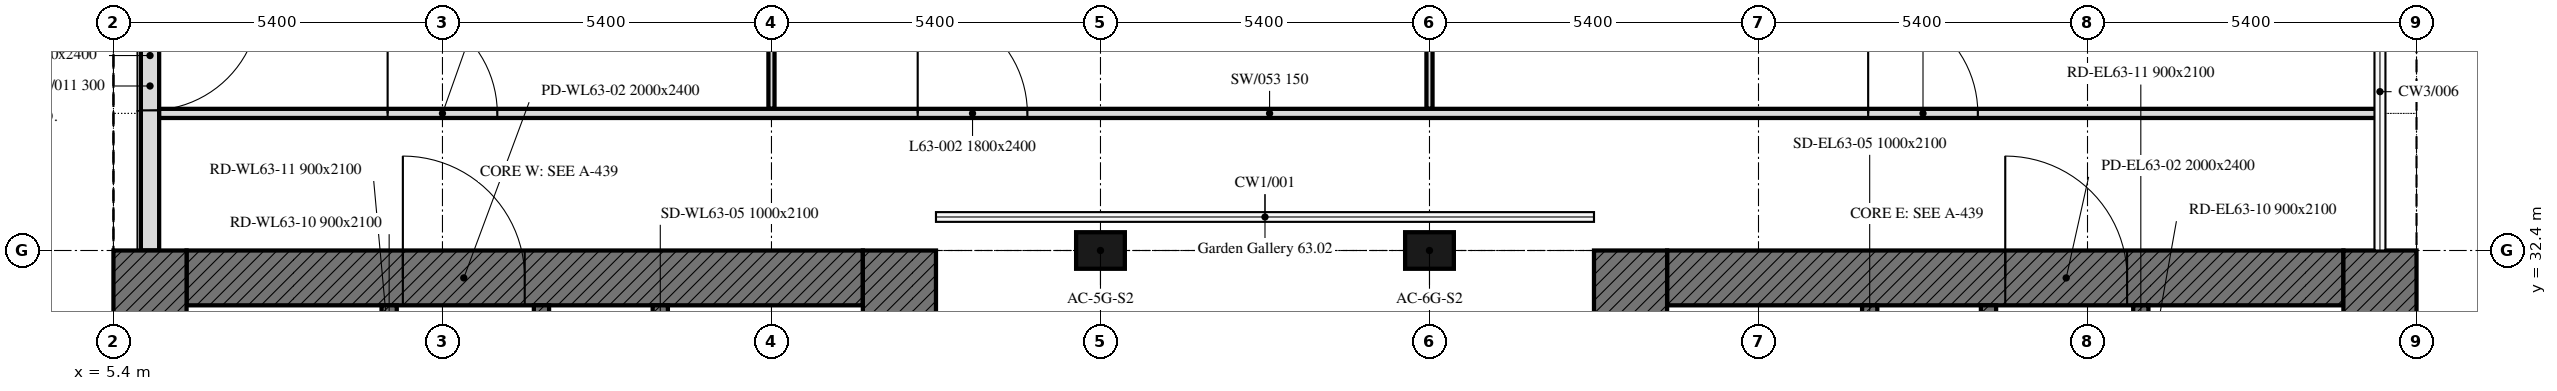
"""IFC4 building model, lengths in metres.
Left out: names, types, materials, properties, quantities, classifications, styles, units other than length and angle.
Written with IfcOpenShell. Run it as: python <this file> out.ifc"""

import sys

from ifc_helpers import new_model, si_unit, direction, frame, frame_2d, origin, origin_2d, place, context, subcontext, project, spatial, rectangle, extrude, element, fill, save


model = new_model("IFC4")
c1 = context("Model", 3, precision=1e-05, world=origin(), true_north=direction((0.0, 1.0)))
c2 = subcontext(c1, "Body", "Model", "MODEL_VIEW")
j1 = project(units=[si_unit("LENGTHUNIT", "METRE"), si_unit("PLANEANGLEUNIT", "RADIAN")], contexts=[c1])
p1 = place(None, origin())
s1 = spatial("IfcSite", under=j1, at=p1, CompositionType="ELEMENT")
p2 = place(p1, origin())
s2 = spatial("IfcBuilding", under=s1, at=p2, CompositionType="ELEMENT")
p3 = place(p2, frame((0.0, 0.0, 260.5)))
s3 = spatial("IfcBuildingStorey", under=s2, at=p3, CompositionType="ELEMENT", Elevation=260.5)
for number, where, z_axis, x_axis in (
    (1, (21.6, 32.4, 0.0), (0.0, 0.0, 1.0), (1.0, 0.0, 0.0)),
    (2, (27.0, 32.4, 0.0), (0.0, 0.0, 1.0), (1.0, 0.0, 0.0)),
):
    element("IfcColumn", number, at=place(p3, frame(where, z_axis=z_axis, x_axis=x_axis)), inside=s3, PredefinedType="COLUMN", context=c2, shape_type="SweptSolid", body=[
        extrude(rectangle(XDim=0.8, YDim=0.6, at=origin_2d()), origin(), (0.0, 0.0, 1.0), 4.5),
    ])
p4 = place(p3, frame((6.0, 37.8, 0.0), z_axis=(0.0, 0.0, 1.0), x_axis=(0.0, -1.0, 0.0)))
e3 = element("IfcWall", 3, at=p4, inside=s3, PredefinedType="SOLIDWALL", context=c2, shape_type="SweptSolid", body=[
    extrude(rectangle(XDim=5.4, YDim=0.3, at=frame_2d((2.7, 0.0))), origin(), (0.0, 0.0, 1.0), 4.5),
])
p5 = place(p4, frame((1.3, 0.0, 0.0)))
e4 = element("IfcOpeningElement", 4, at=p5, cuts=e3, PredefinedType="OPENING", context=c2, shape_type="SweptSolid", body=[
    extrude(rectangle(XDim=1.8, YDim=2.4, at=frame_2d((0.9, 1.2))), frame((0.0, 0.16, 0.0), z_axis=(0.0, -1.0, 0.0), x_axis=(1.0, 0.0, 0.0)), (0.0, 0.0, 1.0), 0.32),
])
p6 = place(p3, frame((6.6, 31.95, 0.0), z_axis=(0.0, 0.0, 1.0), x_axis=(1.0, 0.0, 0.0)))
e5 = element("IfcWall", 5, at=p6, inside=s3, PredefinedType="SOLIDWALL", context=c2, shape_type="SweptSolid", body=[
    extrude(rectangle(XDim=11.1, YDim=0.9, at=frame_2d((5.55, 0.0))), origin(), (0.0, 0.0, 1.0), 4.5),
])
p7 = place(p6, frame((3.55, 0.0, 0.0)))
e6 = element("IfcOpeningElement", 6, at=p7, cuts=e5, PredefinedType="OPENING", context=c2, shape_type="SweptSolid", body=[
    extrude(rectangle(XDim=2.0, YDim=2.4, at=frame_2d((1.0, 1.2))), frame((0.0, 0.45, 0.0), z_axis=(0.0, -1.0, 0.0), x_axis=(1.0, 0.0, 0.0)), (0.0, 0.0, 1.0), 0.9),
])
for number, where, z_axis, x_axis in (
    (7, (6.0, 16.2, 0.0), (0.0, 0.0, 1.0), (0.0, 1.0, 0.0)),
    (8, (18.3, 32.4, 0.0), (0.0, 0.0, 1.0), (0.0, -1.0, 0.0)),
):
    element("IfcWall", number, at=place(p3, frame(where, z_axis=z_axis, x_axis=x_axis)), inside=s3, PredefinedType="SOLIDWALL", context=c2, shape_type="SweptSolid", body=[
        extrude(rectangle(XDim=16.2, YDim=1.2, at=frame_2d((8.1, 0.0))), origin(), (0.0, 0.0, 1.0), 4.5),
    ])
p8 = place(p3, frame((9.925, 17.1, 0.0), z_axis=(0.0, 0.0, 1.0), x_axis=(0.0, 1.0, 0.0)))
e9 = element("IfcWall", 9, at=p8, inside=s3, PredefinedType="SOLIDWALL", context=c2, shape_type="SweptSolid", body=[
    extrude(rectangle(XDim=14.4, YDim=0.25, at=frame_2d((7.2, 0.0))), origin(), (0.0, 0.0, 1.0), 4.5),
])
p9 = place(p8, frame((4.6, 0.0, 0.0)))
e10 = element("IfcOpeningElement", 10, at=p9, cuts=e9, PredefinedType="OPENING", context=c2, shape_type="SweptSolid", body=[
    extrude(rectangle(XDim=1.0, YDim=2.1, at=frame_2d((0.5, 1.05))), frame((0.0, 0.125, 0.0), z_axis=(0.0, -1.0, 0.0), x_axis=(1.0, 0.0, 0.0)), (0.0, 0.0, 1.0), 0.25),
])
p10 = place(p8, frame((7.062, 0.0, 0.0)))
e11 = element("IfcOpeningElement", 11, at=p10, cuts=e9, PredefinedType="OPENING", context=c2, shape_type="SweptSolid", body=[
    extrude(rectangle(XDim=1.2, YDim=2.1, at=frame_2d((0.6, 1.05))), frame((0.0, 0.125, 0.0), z_axis=(0.0, -1.0, 0.0), x_axis=(1.0, 0.0, 0.0)), (0.0, 0.0, 1.0), 0.25),
])
p11 = place(p8, frame((9.726, 0.0, 0.0)))
e12 = element("IfcOpeningElement", 12, at=p11, cuts=e9, PredefinedType="OPENING", context=c2, shape_type="SweptSolid", body=[
    extrude(rectangle(XDim=0.9, YDim=2.1, at=frame_2d((0.45, 1.05))), frame((0.0, 0.125, 0.0), z_axis=(0.0, -1.0, 0.0), x_axis=(1.0, 0.0, 0.0)), (0.0, 0.0, 1.0), 0.25),
])
p12 = place(p8, frame((11.539, 0.0, 0.0)))
e13 = element("IfcOpeningElement", 13, at=p12, cuts=e9, PredefinedType="OPENING", context=c2, shape_type="SweptSolid", body=[
    extrude(rectangle(XDim=0.9, YDim=2.1, at=frame_2d((0.45, 1.05))), frame((0.0, 0.125, 0.0), z_axis=(0.0, -1.0, 0.0), x_axis=(1.0, 0.0, 0.0)), (0.0, 0.0, 1.0), 0.25),
])
p13 = place(p8, frame((13.226, 0.0, 0.0)))
e14 = element("IfcOpeningElement", 14, at=p13, cuts=e9, PredefinedType="OPENING", context=c2, shape_type="SweptSolid", body=[
    extrude(rectangle(XDim=0.9, YDim=2.1, at=frame_2d((0.45, 1.05))), frame((0.0, 0.125, 0.0), z_axis=(0.0, -1.0, 0.0), x_axis=(1.0, 0.0, 0.0)), (0.0, 0.0, 1.0), 0.25),
])
p14 = place(p3, frame((14.375, 17.1, 0.0), z_axis=(0.0, 0.0, 1.0), x_axis=(0.0, 1.0, 0.0)))
e15 = element("IfcWall", 15, at=p14, inside=s3, PredefinedType="SOLIDWALL", context=c2, shape_type="SweptSolid", body=[
    extrude(rectangle(XDim=14.4, YDim=0.25, at=frame_2d((7.2, 0.0))), origin(), (0.0, 0.0, 1.0), 4.5),
])
p15 = place(p14, frame((13.15, 0.0, 0.0)))
e16 = element("IfcOpeningElement", 16, at=p15, cuts=e15, PredefinedType="OPENING", context=c2, shape_type="SweptSolid", body=[
    extrude(rectangle(XDim=1.0, YDim=2.1, at=frame_2d((0.5, 1.05))), frame((0.0, 0.125, 0.0), z_axis=(0.0, -1.0, 0.0), x_axis=(1.0, 0.0, 0.0)), (0.0, 0.0, 1.0), 0.25),
])
p16 = place(p14, frame((3.15, 0.0, 0.0)))
e17 = element("IfcOpeningElement", 17, at=p16, cuts=e15, PredefinedType="OPENING", context=c2, shape_type="SweptSolid", body=[
    extrude(rectangle(XDim=1.1, YDim=2.1, at=frame_2d((0.55, 1.05))), frame((0.0, 0.125, 0.0), z_axis=(0.0, -1.0, 0.0), x_axis=(1.0, 0.0, 0.0)), (0.0, 0.0, 1.0), 0.25),
])
p17 = place(p14, frame((0.7, 0.0, 0.0)))
e18 = element("IfcOpeningElement", 18, at=p17, cuts=e15, PredefinedType="OPENING", context=c2, shape_type="SweptSolid", body=[
    extrude(rectangle(XDim=0.9, YDim=2.1, at=frame_2d((0.45, 1.05))), frame((0.0, 0.125, 0.0), z_axis=(0.0, -1.0, 0.0), x_axis=(1.0, 0.0, 0.0)), (0.0, 0.0, 1.0), 0.25),
])
p18 = place(p14, frame((6.175, 0.0, 0.0)))
e19 = element("IfcOpeningElement", 19, at=p18, cuts=e15, PredefinedType="OPENING", context=c2, shape_type="SweptSolid", body=[
    extrude(rectangle(XDim=0.9, YDim=2.1, at=frame_2d((0.45, 1.05))), frame((0.0, 0.125, 0.0), z_axis=(0.0, -1.0, 0.0), x_axis=(1.0, 0.0, 0.0)), (0.0, 0.0, 1.0), 0.25),
])
p19 = place(p3, frame((12.425, 29.4, 0.0), z_axis=(0.0, 0.0, 1.0), x_axis=(0.0, 1.0, 0.0)))
e20 = element("IfcWall", 20, at=p19, inside=s3, PredefinedType="SOLIDWALL", context=c2, shape_type="SweptSolid", body=[
    extrude(rectangle(XDim=2.1, YDim=0.25, at=frame_2d((1.05, 0.0))), origin(), (0.0, 0.0, 1.0), 4.5),
])
p20 = place(p19, frame((0.5, 0.0, 0.0)))
e21 = element("IfcOpeningElement", 21, at=p20, cuts=e20, PredefinedType="OPENING", context=c2, shape_type="SweptSolid", body=[
    extrude(rectangle(XDim=1.0, YDim=2.1, at=frame_2d((0.5, 1.05))), frame((0.0, 0.125, 0.0), z_axis=(0.0, -1.0, 0.0), x_axis=(1.0, 0.0, 0.0)), (0.0, 0.0, 1.0), 0.25),
])
p21 = place(p3, frame((30.9, 31.95, 0.0), z_axis=(0.0, 0.0, 1.0), x_axis=(1.0, 0.0, 0.0)))
e22 = element("IfcWall", 22, at=p21, inside=s3, PredefinedType="SOLIDWALL", context=c2, shape_type="SweptSolid", body=[
    extrude(rectangle(XDim=11.1, YDim=0.9, at=frame_2d((5.55, 0.0))), origin(), (0.0, 0.0, 1.0), 4.5),
])
p22 = place(p21, frame((5.55, 0.0, 0.0)))
e23 = element("IfcOpeningElement", 23, at=p22, cuts=e22, PredefinedType="OPENING", context=c2, shape_type="SweptSolid", body=[
    extrude(rectangle(XDim=2.0, YDim=2.4, at=frame_2d((1.0, 1.2))), frame((0.0, 0.45, 0.0), z_axis=(0.0, -1.0, 0.0), x_axis=(1.0, 0.0, 0.0)), (0.0, 0.0, 1.0), 0.9),
])
for number, where, z_axis, x_axis in (
    (24, (42.6, 32.4, 0.0), (0.0, 0.0, 1.0), (0.0, -1.0, 0.0)),
    (25, (30.3, 16.2, 0.0), (0.0, 0.0, 1.0), (0.0, 1.0, 0.0)),
):
    element("IfcWall", number, at=place(p3, frame(where, z_axis=z_axis, x_axis=x_axis)), inside=s3, PredefinedType="SOLIDWALL", context=c2, shape_type="SweptSolid", body=[
        extrude(rectangle(XDim=16.2, YDim=1.2, at=frame_2d((8.1, 0.0))), origin(), (0.0, 0.0, 1.0), 4.5),
    ])
p23 = place(p3, frame((38.675, 17.1, 0.0), z_axis=(0.0, 0.0, 1.0), x_axis=(0.0, 1.0, 0.0)))
e26 = element("IfcWall", 26, at=p23, inside=s3, PredefinedType="SOLIDWALL", context=c2, shape_type="SweptSolid", body=[
    extrude(rectangle(XDim=14.4, YDim=0.25, at=frame_2d((7.2, 0.0))), origin(), (0.0, 0.0, 1.0), 4.5),
])
p24 = place(p23, frame((4.6, 0.0, 0.0)))
e27 = element("IfcOpeningElement", 27, at=p24, cuts=e26, PredefinedType="OPENING", context=c2, shape_type="SweptSolid", body=[
    extrude(rectangle(XDim=1.0, YDim=2.1, at=frame_2d((0.5, 1.05))), frame((0.0, 0.125, 0.0), z_axis=(0.0, -1.0, 0.0), x_axis=(1.0, 0.0, 0.0)), (0.0, 0.0, 1.0), 0.25),
])
p25 = place(p23, frame((7.062, 0.0, 0.0)))
e28 = element("IfcOpeningElement", 28, at=p25, cuts=e26, PredefinedType="OPENING", context=c2, shape_type="SweptSolid", body=[
    extrude(rectangle(XDim=1.2, YDim=2.1, at=frame_2d((0.6, 1.05))), frame((0.0, 0.125, 0.0), z_axis=(0.0, -1.0, 0.0), x_axis=(1.0, 0.0, 0.0)), (0.0, 0.0, 1.0), 0.25),
])
p26 = place(p23, frame((10.106, 0.0, 0.0)))
e29 = element("IfcOpeningElement", 29, at=p26, cuts=e26, PredefinedType="OPENING", context=c2, shape_type="SweptSolid", body=[
    extrude(rectangle(XDim=0.9, YDim=2.1, at=frame_2d((0.45, 1.05))), frame((0.0, 0.125, 0.0), z_axis=(0.0, -1.0, 0.0), x_axis=(1.0, 0.0, 0.0)), (0.0, 0.0, 1.0), 0.25),
])
p27 = place(p23, frame((12.048, 0.0, 0.0)))
e30 = element("IfcOpeningElement", 30, at=p27, cuts=e26, PredefinedType="OPENING", context=c2, shape_type="SweptSolid", body=[
    extrude(rectangle(XDim=0.9, YDim=2.1, at=frame_2d((0.45, 1.05))), frame((0.0, 0.125, 0.0), z_axis=(0.0, -1.0, 0.0), x_axis=(1.0, 0.0, 0.0)), (0.0, 0.0, 1.0), 0.25),
])
p28 = place(p23, frame((13.354, 0.0, 0.0)))
e31 = element("IfcOpeningElement", 31, at=p28, cuts=e26, PredefinedType="OPENING", context=c2, shape_type="SweptSolid", body=[
    extrude(rectangle(XDim=0.9, YDim=2.1, at=frame_2d((0.45, 1.05))), frame((0.0, 0.125, 0.0), z_axis=(0.0, -1.0, 0.0), x_axis=(1.0, 0.0, 0.0)), (0.0, 0.0, 1.0), 0.25),
])
p29 = place(p3, frame((34.225, 17.1, 0.0), z_axis=(0.0, 0.0, 1.0), x_axis=(0.0, 1.0, 0.0)))
e32 = element("IfcWall", 32, at=p29, inside=s3, PredefinedType="SOLIDWALL", context=c2, shape_type="SweptSolid", body=[
    extrude(rectangle(XDim=14.4, YDim=0.25, at=frame_2d((7.2, 0.0))), origin(), (0.0, 0.0, 1.0), 4.5),
])
p30 = place(p29, frame((13.15, 0.0, 0.0)))
e33 = element("IfcOpeningElement", 33, at=p30, cuts=e32, PredefinedType="OPENING", context=c2, shape_type="SweptSolid", body=[
    extrude(rectangle(XDim=1.0, YDim=2.1, at=frame_2d((0.5, 1.05))), frame((0.0, 0.125, 0.0), z_axis=(0.0, -1.0, 0.0), x_axis=(1.0, 0.0, 0.0)), (0.0, 0.0, 1.0), 0.25),
])
p31 = place(p29, frame((3.15, 0.0, 0.0)))
e34 = element("IfcOpeningElement", 34, at=p31, cuts=e32, PredefinedType="OPENING", context=c2, shape_type="SweptSolid", body=[
    extrude(rectangle(XDim=1.1, YDim=2.1, at=frame_2d((0.55, 1.05))), frame((0.0, 0.125, 0.0), z_axis=(0.0, -1.0, 0.0), x_axis=(1.0, 0.0, 0.0)), (0.0, 0.0, 1.0), 0.25),
])
p32 = place(p29, frame((0.7, 0.0, 0.0)))
e35 = element("IfcOpeningElement", 35, at=p32, cuts=e32, PredefinedType="OPENING", context=c2, shape_type="SweptSolid", body=[
    extrude(rectangle(XDim=0.9, YDim=2.1, at=frame_2d((0.45, 1.05))), frame((0.0, 0.125, 0.0), z_axis=(0.0, -1.0, 0.0), x_axis=(1.0, 0.0, 0.0)), (0.0, 0.0, 1.0), 0.25),
])
p33 = place(p29, frame((6.175, 0.0, 0.0)))
e36 = element("IfcOpeningElement", 36, at=p33, cuts=e32, PredefinedType="OPENING", context=c2, shape_type="SweptSolid", body=[
    extrude(rectangle(XDim=0.9, YDim=2.1, at=frame_2d((0.45, 1.05))), frame((0.0, 0.125, 0.0), z_axis=(0.0, -1.0, 0.0), x_axis=(1.0, 0.0, 0.0)), (0.0, 0.0, 1.0), 0.25),
])
p34 = place(p3, frame((36.175, 29.4, 0.0), z_axis=(0.0, 0.0, 1.0), x_axis=(0.0, 1.0, 0.0)))
e37 = element("IfcWall", 37, at=p34, inside=s3, PredefinedType="SOLIDWALL", context=c2, shape_type="SweptSolid", body=[
    extrude(rectangle(XDim=2.1, YDim=0.25, at=frame_2d((1.05, 0.0))), origin(), (0.0, 0.0, 1.0), 4.5),
])
p35 = place(p34, frame((0.5, 0.0, 0.0)))
e38 = element("IfcOpeningElement", 38, at=p35, cuts=e37, PredefinedType="OPENING", context=c2, shape_type="SweptSolid", body=[
    extrude(rectangle(XDim=1.0, YDim=2.1, at=frame_2d((0.5, 1.05))), frame((0.0, 0.125, 0.0), z_axis=(0.0, -1.0, 0.0), x_axis=(1.0, 0.0, 0.0)), (0.0, 0.0, 1.0), 0.25),
])
for number, where, z_axis, x_axis in (
    (39, (27.0, 37.43, 0.0), (0.0, 0.0, 1.0), (0.0, -1.0, 0.0)),
    (40, (16.2, 37.43, 0.0), (0.0, 0.0, 1.0), (0.0, -1.0, 0.0)),
):
    element("IfcWall", number, at=place(p3, frame(where, z_axis=z_axis, x_axis=x_axis)), inside=s3, PredefinedType="PARTITIONING", context=c2, shape_type="SweptSolid", body=[
        extrude(rectangle(XDim=2.705, YDim=0.1, at=frame_2d((1.353, 0.0))), origin(), (0.0, 0.0, 1.0), 4.5),
    ])
p36 = place(p3, frame((6.151, 34.65, 0.0), z_axis=(0.0, 0.0, 1.0), x_axis=(1.0, 0.0, 0.0)))
e41 = element("IfcWall", 41, at=p36, inside=s3, PredefinedType="PARTITIONING", context=c2, shape_type="SweptSolid", body=[
    extrude(rectangle(XDim=36.449, YDim=0.15, at=frame_2d((18.225, 0.0))), origin(), (0.0, 0.0, 1.0), 4.5),
])
p37 = place(p36, frame((28.049, 0.0, 0.0)))
e42 = element("IfcOpeningElement", 42, at=p37, cuts=e41, PredefinedType="OPENING", context=c2, shape_type="SweptSolid", body=[
    extrude(rectangle(XDim=1.8, YDim=2.4, at=frame_2d((0.9, 1.2))), frame((0.0, 0.075, 0.0), z_axis=(0.0, -1.0, 0.0), x_axis=(1.0, 0.0, 0.0)), (0.0, 0.0, 1.0), 0.15),
])
p38 = place(p36, frame((12.449, 0.0, 0.0)))
e43 = element("IfcOpeningElement", 43, at=p38, cuts=e41, PredefinedType="OPENING", context=c2, shape_type="SweptSolid", body=[
    extrude(rectangle(XDim=1.8, YDim=2.4, at=frame_2d((0.9, 1.2))), frame((0.0, 0.075, 0.0), z_axis=(0.0, -1.0, 0.0), x_axis=(1.0, 0.0, 0.0)), (0.0, 0.0, 1.0), 0.15),
])
p39 = place(p36, frame((3.749, 0.0, 0.0)))
e44 = element("IfcOpeningElement", 44, at=p39, cuts=e41, PredefinedType="OPENING", context=c2, shape_type="SweptSolid", body=[
    extrude(rectangle(XDim=1.8, YDim=2.4, at=frame_2d((0.9, 1.2))), frame((0.0, 0.075, 0.0), z_axis=(0.0, -1.0, 0.0), x_axis=(1.0, 0.0, 0.0)), (0.0, 0.0, 1.0), 0.15),
])
p40 = place(p5, origin())
e45 = element("IfcDoor", 45, at=p40, inside=s3, OperationType="DOUBLE_DOOR_DOUBLE_SWING", PredefinedType="DOOR", context=c2, shape_type="SweptSolid", body=[
    extrude(rectangle(XDim=1.8, YDim=2.4, at=frame_2d((0.9, 1.2))), frame((0.0, 0.025, 0.0), z_axis=(0.0, -1.0, 0.0), x_axis=(1.0, 0.0, 0.0)), (0.0, 0.0, 1.0), 0.05),
])
fill(e4, e45)
p41 = place(p7, origin())
e46 = element("IfcDoor", 46, at=p41, inside=s3, OperationType="DOUBLE_DOOR_SINGLE_SWING", PredefinedType="DOOR", context=c2, shape_type="SweptSolid", body=[
    extrude(rectangle(XDim=2.0, YDim=2.4, at=frame_2d((1.0, 1.2))), frame((0.0, 0.025, 0.0), z_axis=(0.0, -1.0, 0.0), x_axis=(1.0, 0.0, 0.0)), (0.0, 0.0, 1.0), 0.05),
])
fill(e6, e46)
p42 = place(p22, origin())
e47 = element("IfcDoor", 47, at=p42, inside=s3, OperationType="DOUBLE_DOOR_SINGLE_SWING", PredefinedType="DOOR", context=c2, shape_type="SweptSolid", body=[
    extrude(rectangle(XDim=2.0, YDim=2.4, at=frame_2d((1.0, 1.2))), frame((0.0, 0.025, 0.0), z_axis=(0.0, -1.0, 0.0), x_axis=(1.0, 0.0, 0.0)), (0.0, 0.0, 1.0), 0.05),
])
fill(e23, e47)
p43 = place(p37, origin())
e48 = element("IfcDoor", 48, at=p43, inside=s3, OperationType="DOUBLE_DOOR_SINGLE_SWING", PredefinedType="DOOR", context=c2, shape_type="SweptSolid", body=[
    extrude(rectangle(XDim=1.8, YDim=2.4, at=frame_2d((0.9, 1.2))), frame((0.0, 0.025, 0.0), z_axis=(0.0, -1.0, 0.0), x_axis=(1.0, 0.0, 0.0)), (0.0, 0.0, 1.0), 0.05),
])
fill(e42, e48)
p44 = place(p38, origin())
e49 = element("IfcDoor", 49, at=p44, inside=s3, OperationType="DOUBLE_DOOR_SINGLE_SWING", PredefinedType="DOOR", context=c2, shape_type="SweptSolid", body=[
    extrude(rectangle(XDim=1.8, YDim=2.4, at=frame_2d((0.9, 1.2))), frame((0.0, 0.025, 0.0), z_axis=(0.0, -1.0, 0.0), x_axis=(1.0, 0.0, 0.0)), (0.0, 0.0, 1.0), 0.05),
])
fill(e43, e49)
p45 = place(p39, origin())
e50 = element("IfcDoor", 50, at=p45, inside=s3, OperationType="DOUBLE_DOOR_SINGLE_SWING", PredefinedType="DOOR", context=c2, shape_type="SweptSolid", body=[
    extrude(rectangle(XDim=1.8, YDim=2.4, at=frame_2d((0.9, 1.2))), frame((0.0, 0.025, 0.0), z_axis=(0.0, -1.0, 0.0), x_axis=(1.0, 0.0, 0.0)), (0.0, 0.0, 1.0), 0.05),
])
fill(e44, e50)
save(model, sys.argv[1])
